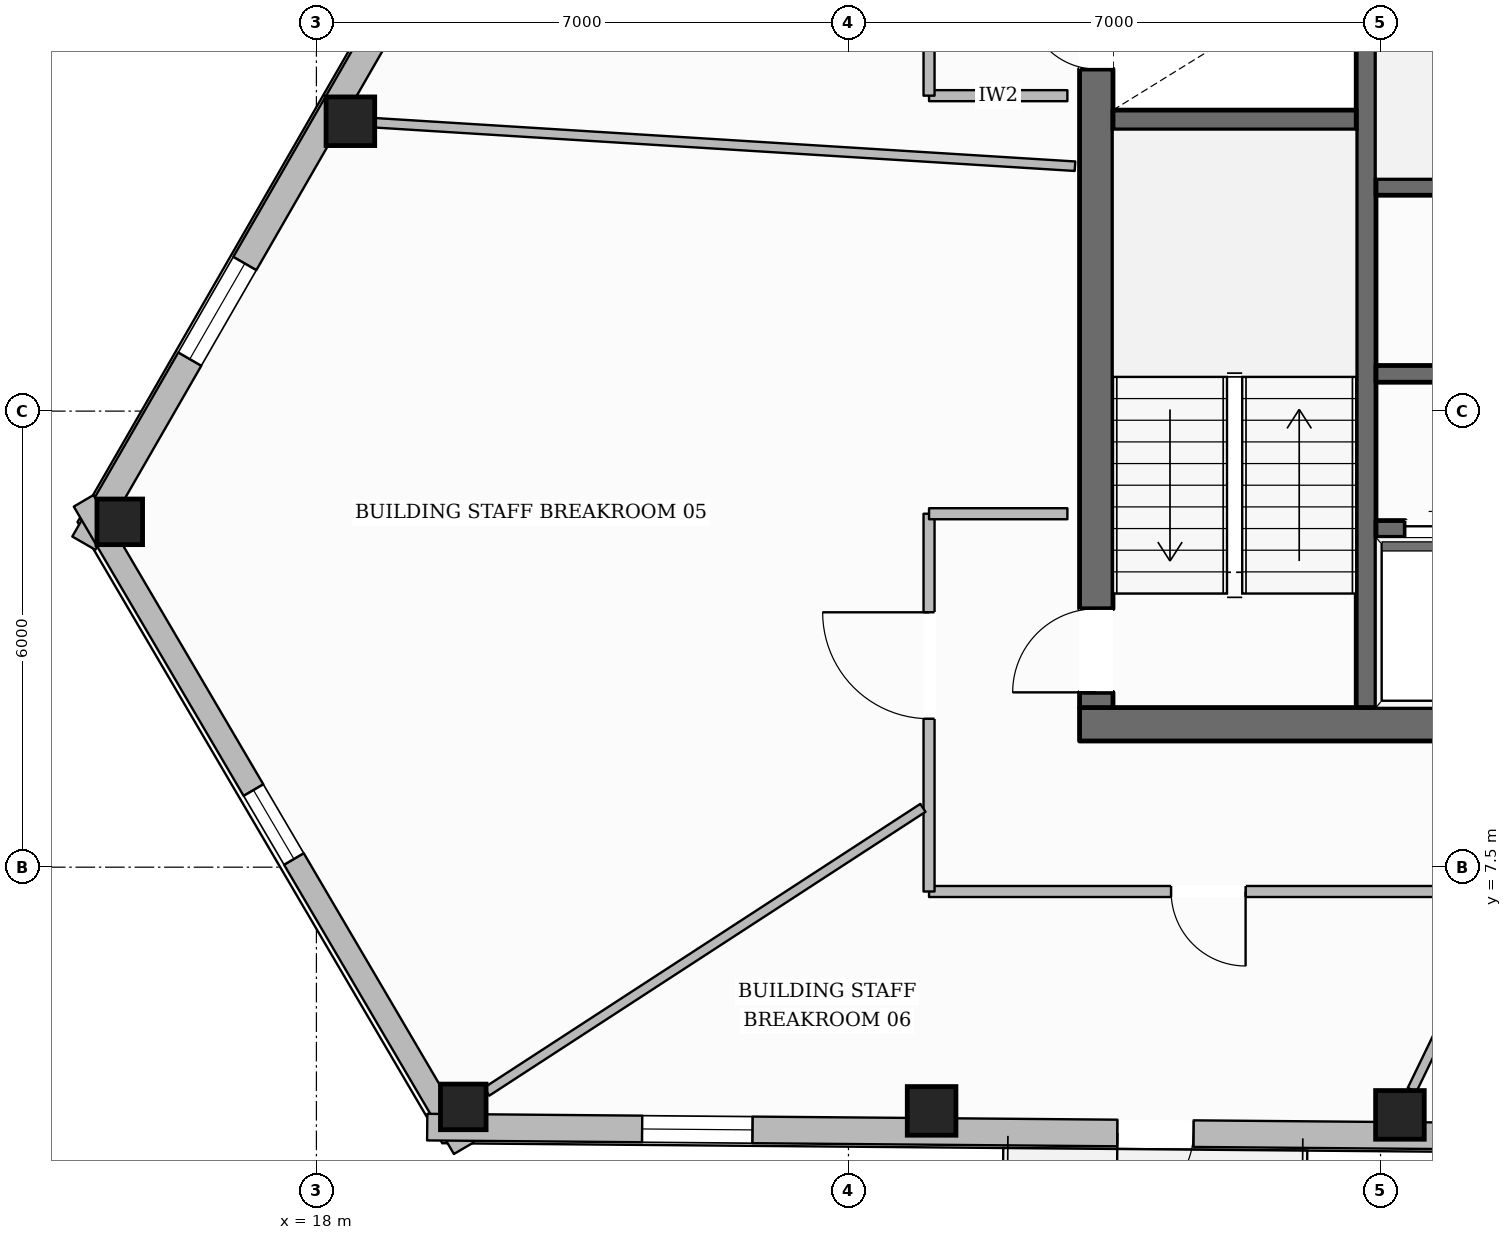
"""IFC4 building model, lengths in metres.
Left out: names, types, materials, properties, quantities, classifications, styles, units other than length and angle.
Written with IfcOpenShell. Run it as: python <this file> out.ifc"""

import sys

from ifc_helpers import new_model, si_unit, direction, frame, frame_2d, origin, origin_2d, place, context, subcontext, project, spatial, rectangle, hollow_rectangle, extrude, element, fill, save


model = new_model("IFC4")
c1 = context("Model", 3, precision=1e-05, world=origin(), true_north=direction((0.0, 1.0)))
c2 = subcontext(c1, "Body", "Model", "MODEL_VIEW")
j1 = project(units=[si_unit("LENGTHUNIT", "METRE"), si_unit("PLANEANGLEUNIT", "RADIAN")], contexts=[c1])
p1 = place(None, origin())
s1 = spatial("IfcSite", under=j1, at=p1, CompositionType="ELEMENT")
p2 = place(p1, origin())
s2 = spatial("IfcBuilding", under=s1, at=p2, CompositionType="ELEMENT")
p3 = place(p2, frame((0.0, 0.0, 191.95)))
s3 = spatial("IfcBuildingStorey", under=s2, at=p3, CompositionType="ELEMENT", Elevation=191.95)
p4 = place(p3, frame((28.04, 9.38, 0.0), z_axis=(0.0, 0.0, 1.0), x_axis=(1.0, 0.0, 0.0)))
e1 = element("IfcWall", 1, at=p4, inside=s3, PredefinedType="SOLIDWALL", context=c2, shape_type="SweptSolid", body=[
    extrude(rectangle(XDim=19.92, YDim=0.44, at=frame_2d((9.96, 0.0))), origin(), (0.0, 0.0, 1.0), 3.6),
])
p5 = place(p4, frame((10.46, 0.0, 0.0)))
e2 = element("IfcOpeningElement", 2, at=p5, cuts=e1, PredefinedType="OPENING", context=c2, shape_type="SweptSolid", body=[
    extrude(rectangle(XDim=1.4, YDim=2.2, at=frame_2d((0.7, 1.1))), frame((0.0, 0.23, 0.0), z_axis=(0.0, -1.0, 0.0), x_axis=(1.0, 0.0, 0.0)), (0.0, 0.0, 1.0), 0.46),
])
p6 = place(p3, frame((28.26, 9.6, 0.0), z_axis=(0.0, 0.0, 1.0), x_axis=(0.0, 1.0, 0.0)))
e3 = element("IfcWall", 3, at=p6, inside=s3, PredefinedType="SOLIDWALL", context=c2, shape_type="SweptSolid", body=[
    extrude(rectangle(XDim=13.0, YDim=0.44, at=frame_2d((6.5, 0.0))), origin(), (0.0, 0.0, 1.0), 3.6),
])
p7 = place(p6, frame((0.2, 0.0, 0.0)))
e4 = element("IfcOpeningElement", 4, at=p7, cuts=e3, PredefinedType="OPENING", context=c2, shape_type="SweptSolid", body=[
    extrude(rectangle(XDim=1.1, YDim=2.15, at=frame_2d((0.55, 1.075))), frame((0.0, 0.23, 0.0), z_axis=(0.0, -1.0, 0.0), x_axis=(1.0, 0.0, 0.0)), (0.0, 0.0, 1.0), 0.46),
])
p8 = place(p6, frame((8.4, 0.0, 0.0)))
e5 = element("IfcOpeningElement", 5, at=p8, cuts=e3, PredefinedType="OPENING", context=c2, shape_type="SweptSolid", body=[
    extrude(rectangle(XDim=0.9, YDim=2.1, at=frame_2d((0.45, 1.05))), frame((0.0, 0.23, 0.0), z_axis=(0.0, -1.0, 0.0), x_axis=(1.0, 0.0, 0.0)), (0.0, 0.0, 1.0), 0.46),
])
p9 = place(p3, frame((31.81, 9.6, 0.0), z_axis=(0.0, 0.0, 1.0), x_axis=(0.0, 1.0, 0.0)))
e6 = element("IfcWall", 6, at=p9, inside=s3, PredefinedType="SHEAR", context=c2, shape_type="SweptSolid", body=[
    extrude(rectangle(XDim=13.0, YDim=0.26, at=frame_2d((6.5, 0.0))), origin(), (0.0, 0.0, 1.0), 3.6),
])
p10 = place(p9, frame((10.925, 0.0, 0.0)))
e7 = element("IfcOpeningElement", 7, at=p10, cuts=e6, PredefinedType="OPENING", context=c2, shape_type="SweptSolid", body=[
    extrude(rectangle(XDim=1.25, YDim=2.25, at=frame_2d((0.625, 1.125))), frame((0.0, 0.14, 0.0), z_axis=(0.0, -1.0, 0.0), x_axis=(1.0, 0.0, 0.0)), (0.0, 0.0, 1.0), 0.28),
])
p11 = place(p3, frame((28.48, 17.33, 0.0), z_axis=(0.0, 0.0, 1.0), x_axis=(1.0, 0.0, 0.0)))
e8 = element("IfcWall", 8, at=p11, inside=s3, PredefinedType="SHEAR", context=c2, shape_type="SweptSolid", body=[
    extrude(rectangle(XDim=3.2, YDim=0.26, at=frame_2d((1.6, 0.0))), origin(), (0.0, 0.0, 1.0), 3.6),
])
p12 = place(p3, frame((31.94, 16.45, 0.0), z_axis=(0.0, 0.0, 1.0), x_axis=(1.0, 0.0, 0.0)))
e9 = element("IfcWall", 9, at=p12, inside=s3, PredefinedType="SOLIDWALL", context=c2, shape_type="SweptSolid", body=[
    extrude(rectangle(XDim=12.12, YDim=0.22, at=frame_2d((6.06, 0.0))), origin(), (0.0, 0.0, 1.0), 3.6),
])
p13 = place(p3, frame((31.94, 13.99, 0.0), z_axis=(0.0, 0.0, 1.0), x_axis=(1.0, 0.0, 0.0)))
e10 = element("IfcWall", 10, at=p13, inside=s3, PredefinedType="SOLIDWALL", context=c2, shape_type="SweptSolid", body=[
    extrude(rectangle(XDim=12.12, YDim=0.22, at=frame_2d((6.06, 0.0))), origin(), (0.0, 0.0, 1.0), 3.6),
])
p14 = place(p13, frame((1.91, 0.0, 0.0)))
e11 = element("IfcOpeningElement", 11, at=p14, cuts=e10, PredefinedType="OPENING", context=c2, shape_type="SweptSolid", body=[
    extrude(rectangle(XDim=0.9, YDim=2.1, at=frame_2d((0.45, 1.05))), frame((0.0, 0.12, 0.0), z_axis=(0.0, -1.0, 0.0), x_axis=(1.0, 0.0, 0.0)), (0.0, 0.0, 1.0), 0.24),
])
p15 = place(p13, frame((7.95, 0.0, 0.0)))
e12 = element("IfcOpeningElement", 12, at=p15, cuts=e10, PredefinedType="OPENING", context=c2, shape_type="SweptSolid", body=[
    extrude(rectangle(XDim=1.02, YDim=2.15, at=frame_2d((0.51, 1.075))), frame((0.0, 0.12, 0.0), z_axis=(0.0, -1.0, 0.0), x_axis=(1.0, 0.0, 0.0)), (0.0, 0.0, 1.0), 0.24),
])
p16 = place(p3, frame((31.94, 11.95, 0.0), z_axis=(0.0, 0.0, 1.0), x_axis=(1.0, 0.0, 0.0)))
e13 = element("IfcWall", 13, at=p16, inside=s3, PredefinedType="SOLIDWALL", context=c2, shape_type="SweptSolid", body=[
    extrude(rectangle(XDim=6.19, YDim=0.22, at=frame_2d((3.095, 0.0))), origin(), (0.0, 0.0, 1.0), 3.6),
])
p17 = place(p16, frame((0.385, 0.0, 0.0)))
e14 = element("IfcOpeningElement", 14, at=p17, cuts=e13, PredefinedType="OPENING", context=c2, shape_type="SweptSolid", body=[
    extrude(rectangle(XDim=1.1, YDim=2.2, at=frame_2d((0.55, 1.1))), frame((0.0, 0.12, 0.0), z_axis=(0.0, -1.0, 0.0), x_axis=(1.0, 0.0, 0.0)), (0.0, 0.0, 1.0), 0.24),
])
p18 = place(p16, frame((2.435, 0.0, 0.0)))
e15 = element("IfcOpeningElement", 15, at=p18, cuts=e13, PredefinedType="OPENING", context=c2, shape_type="SweptSolid", body=[
    extrude(rectangle(XDim=1.1, YDim=2.2, at=frame_2d((0.55, 1.1))), frame((0.0, 0.12, 0.0), z_axis=(0.0, -1.0, 0.0), x_axis=(1.0, 0.0, 0.0)), (0.0, 0.0, 1.0), 0.24),
])
p19 = place(p16, frame((4.485, 0.0, 0.0)))
e16 = element("IfcOpeningElement", 16, at=p19, cuts=e13, PredefinedType="OPENING", context=c2, shape_type="SweptSolid", body=[
    extrude(rectangle(XDim=1.1, YDim=2.2, at=frame_2d((0.55, 1.1))), frame((0.0, 0.12, 0.0), z_axis=(0.0, -1.0, 0.0), x_axis=(1.0, 0.0, 0.0)), (0.0, 0.0, 1.0), 0.24),
])
p20 = place(p3, frame((18.447, 17.313, 0.0), z_axis=(0.0, 0.0, 1.0), x_axis=(1.0, 0.0, 0.0)))
e17 = element("IfcColumn", 17, at=p20, inside=s3, PredefinedType="COLUMN", context=c2, shape_type="SweptSolid", body=[
    extrude(hollow_rectangle(XDim=0.64, YDim=0.64, WallThickness=0.028, at=origin_2d()), origin(), (0.0, 0.0, 1.0), 3.6),
])
for number, where, z_axis, x_axis in (
    (18, (15.413, 12.043, 0.0), (0.0, 0.0, 1.0), (1.0, 0.0, 0.0)),
    (19, (19.932, 4.346, 0.0), (0.0, 0.0, 1.0), (1.0, 0.0, 0.0)),
):
    element("IfcColumn", number, at=place(p3, frame(where, z_axis=z_axis, x_axis=x_axis)), inside=s3, PredefinedType="COLUMN", context=c2, shape_type="SweptSolid", body=[
        extrude(hollow_rectangle(XDim=0.6, YDim=0.6, WallThickness=0.028, at=origin_2d()), origin(), (0.0, 0.0, 1.0), 3.6),
    ])
for number, where, z_axis, x_axis in (
    (20, (26.094, 4.294, 0.0), (0.0, 0.0, 1.0), (1.0, 0.0, 0.0)),
    (21, (32.255, 4.241, 0.0), (0.0, 0.0, 1.0), (1.0, 0.0, 0.0)),
):
    element("IfcColumn", number, at=place(p3, frame(where, z_axis=z_axis, x_axis=x_axis)), inside=s3, PredefinedType="COLUMN", context=c2, shape_type="SweptSolid", body=[
        extrude(hollow_rectangle(XDim=0.64, YDim=0.64, WallThickness=0.028, at=origin_2d()), origin(), (0.0, 0.0, 1.0), 3.6),
    ])
p21 = place(p3, frame((14.94, 11.763, 0.0), z_axis=(0.0, 0.0, 1.0), x_axis=(0.498943522518, 0.866634502739, 0.0)))
e22 = element("IfcWall", 22, at=p21, inside=s3, PredefinedType="STANDARD", context=c2, shape_type="SweptSolid", body=[
    extrude(rectangle(XDim=37.445, YDim=0.35, at=frame_2d((18.723, 0.0))), origin(), (0.0, 0.0, 1.0), 3.132),
])
p22 = place(p21, frame((27.484, 0.0, 0.0)))
e23 = element("IfcOpeningElement", 23, at=p22, cuts=e22, PredefinedType="OPENING", context=c2, shape_type="SweptSolid", body=[
    extrude(rectangle(XDim=1.0, YDim=2.2, at=frame_2d((0.5, 1.1))), frame((0.0, 0.185, 0.0), z_axis=(0.0, -1.0, 0.0), x_axis=(1.0, 0.0, 0.0)), (0.0, 0.0, 1.0), 0.37),
])
p23 = place(p21, frame((33.2, 0.0, 0.65)))
e24 = element("IfcOpeningElement", 24, at=p23, cuts=e22, PredefinedType="OPENING", context=c2, shape_type="SweptSolid", body=[
    extrude(rectangle(XDim=1.45, YDim=1.75, at=frame_2d((0.725, 0.875))), frame((0.0, 0.185, 0.0), z_axis=(0.0, -1.0, 0.0), x_axis=(1.0, 0.0, 0.0)), (0.0, 0.0, 1.0), 0.37),
])
p24 = place(p21, frame((21.038, 0.0, 0.65)))
e25 = element("IfcOpeningElement", 25, at=p24, cuts=e22, PredefinedType="OPENING", context=c2, shape_type="SweptSolid", body=[
    extrude(rectangle(XDim=1.45, YDim=1.75, at=frame_2d((0.725, 0.875))), frame((0.0, 0.185, 0.0), z_axis=(0.0, -1.0, 0.0), x_axis=(1.0, 0.0, 0.0)), (0.0, 0.0, 1.0), 0.37),
])
p25 = place(p21, frame((8.875, 0.0, 0.65)))
e26 = element("IfcOpeningElement", 26, at=p25, cuts=e22, PredefinedType="OPENING", context=c2, shape_type="SweptSolid", body=[
    extrude(rectangle(XDim=1.45, YDim=1.75, at=frame_2d((0.725, 0.875))), frame((0.0, 0.185, 0.0), z_axis=(0.0, -1.0, 0.0), x_axis=(1.0, 0.0, 0.0)), (0.0, 0.0, 1.0), 0.37),
])
p26 = place(p21, frame((2.795, 0.0, 0.65)))
e27 = element("IfcOpeningElement", 27, at=p26, cuts=e22, PredefinedType="OPENING", context=c2, shape_type="SweptSolid", body=[
    extrude(rectangle(XDim=1.45, YDim=1.75, at=frame_2d((0.725, 0.875))), frame((0.0, 0.185, 0.0), z_axis=(0.0, -1.0, 0.0), x_axis=(1.0, 0.0, 0.0)), (0.0, 0.0, 1.0), 0.37),
])
p27 = place(p3, frame((19.938, 3.802, 0.0), z_axis=(0.0, 0.0, 1.0), x_axis=(-0.506326456483, 0.862341880849, 0.0)))
e28 = element("IfcWall", 28, at=p27, inside=s3, PredefinedType="STANDARD", context=c2, shape_type="SweptSolid", body=[
    extrude(rectangle(XDim=9.877, YDim=0.3, at=frame_2d((4.938, 0.0))), origin(), (0.0, 0.0, 1.0), 3.132),
])
p28 = place(p27, frame((4.414, 0.0, 0.65)))
e29 = element("IfcOpeningElement", 29, at=p28, cuts=e28, PredefinedType="OPENING", context=c2, shape_type="SweptSolid", body=[
    extrude(rectangle(XDim=1.05, YDim=1.7, at=frame_2d((0.525, 0.85))), frame((0.0, 0.16, 0.0), z_axis=(0.0, -1.0, 0.0), x_axis=(1.0, 0.0, 0.0)), (0.0, 0.0, 1.0), 0.32),
])
p29 = place(p3, frame((57.379, 3.757, 0.0), z_axis=(0.0, 0.0, 1.0), x_axis=(-0.999963726544, 0.008517370208, 0.0)))
e30 = element("IfcWall", 30, at=p29, inside=s3, PredefinedType="STANDARD", context=c2, shape_type="SweptSolid", body=[
    extrude(rectangle(XDim=37.922, YDim=0.35, at=frame_2d((18.961, 0.0))), origin(), (0.0, 0.0, 1.0), 3.132),
])
p30 = place(p29, frame((27.842, 0.0, 0.0)))
e31 = element("IfcOpeningElement", 31, at=p30, cuts=e30, PredefinedType="OPENING", context=c2, shape_type="SweptSolid", body=[
    extrude(rectangle(XDim=1.0, YDim=2.2, at=frame_2d((0.5, 1.1))), frame((0.0, 0.185, 0.0), z_axis=(0.0, -1.0, 0.0), x_axis=(1.0, 0.0, 0.0)), (0.0, 0.0, 1.0), 0.37),
])
p31 = place(p29, frame((33.644, 0.0, 0.65)))
e32 = element("IfcOpeningElement", 32, at=p31, cuts=e30, PredefinedType="OPENING", context=c2, shape_type="SweptSolid", body=[
    extrude(rectangle(XDim=1.45, YDim=1.75, at=frame_2d((0.725, 0.875))), frame((0.0, 0.185, 0.0), z_axis=(0.0, -1.0, 0.0), x_axis=(1.0, 0.0, 0.0)), (0.0, 0.0, 1.0), 0.37),
])
p32 = place(p29, frame((21.321, 0.0, 0.65)))
e33 = element("IfcOpeningElement", 33, at=p32, cuts=e30, PredefinedType="OPENING", context=c2, shape_type="SweptSolid", body=[
    extrude(rectangle(XDim=1.45, YDim=1.75, at=frame_2d((0.725, 0.875))), frame((0.0, 0.185, 0.0), z_axis=(0.0, -1.0, 0.0), x_axis=(1.0, 0.0, 0.0)), (0.0, 0.0, 1.0), 0.37),
])
p33 = place(p29, frame((8.998, 0.0, 0.65)))
e34 = element("IfcOpeningElement", 34, at=p33, cuts=e30, PredefinedType="OPENING", context=c2, shape_type="SweptSolid", body=[
    extrude(rectangle(XDim=1.45, YDim=1.75, at=frame_2d((0.725, 0.875))), frame((0.0, 0.185, 0.0), z_axis=(0.0, -1.0, 0.0), x_axis=(1.0, 0.0, 0.0)), (0.0, 0.0, 1.0), 0.37),
])
p34 = place(p29, frame((2.836, 0.0, 0.65)))
e35 = element("IfcOpeningElement", 35, at=p34, cuts=e30, PredefinedType="OPENING", context=c2, shape_type="SweptSolid", body=[
    extrude(rectangle(XDim=1.45, YDim=1.75, at=frame_2d((0.725, 0.875))), frame((0.0, 0.185, 0.0), z_axis=(0.0, -1.0, 0.0), x_axis=(1.0, 0.0, 0.0)), (0.0, 0.0, 1.0), 0.37),
])
p35 = place(p3, frame((27.88, 17.65, 0.0), z_axis=(0.0, 0.0, 1.0), x_axis=(-1.0, 0.0, 0.0)))
e36 = element("IfcWall", 36, at=p35, inside=s3, PredefinedType="PARTITIONING", context=c2, shape_type="SweptSolid", body=[
    extrude(rectangle(XDim=1.82, YDim=0.145, at=frame_2d((0.91, 0.0))), origin(), (0.0, 0.0, 1.0), 3.6),
])
p36 = place(p3, frame((26.06, 17.65, 0.0), z_axis=(0.0, 0.0, 1.0), x_axis=(0.0, 1.0, 0.0)))
e37 = element("IfcWall", 37, at=p36, inside=s3, PredefinedType="PARTITIONING", context=c2, shape_type="SweptSolid", body=[
    extrude(rectangle(XDim=7.37, YDim=0.145, at=frame_2d((3.685, 0.0))), origin(), (0.0, 0.0, 1.0), 3.339),
])
p37 = place(p36, frame((2.985, 0.0, 0.0)))
e38 = element("IfcOpeningElement", 38, at=p37, cuts=e37, PredefinedType="OPENING", context=c2, shape_type="SweptSolid", body=[
    extrude(rectangle(XDim=1.4, YDim=2.2, at=frame_2d((0.7, 1.1))), frame((0.0, 0.083, 0.0), z_axis=(0.0, -1.0, 0.0), x_axis=(1.0, 0.0, 0.0)), (0.0, 0.0, 1.0), 0.165),
])
p38 = place(p3, frame((49.94, 7.18, 0.0), z_axis=(0.0, 0.0, 1.0), x_axis=(-1.0, 0.0, 0.0)))
e39 = element("IfcWall", 39, at=p38, inside=s3, PredefinedType="PARTITIONING", context=c2, shape_type="SweptSolid", body=[
    extrude(rectangle(XDim=23.88, YDim=0.145, at=frame_2d((11.94, 0.0))), origin(), (0.0, 0.0, 1.0), 3.6),
])
p39 = place(p38, frame((19.715, 0.0, 0.0)))
e40 = element("IfcOpeningElement", 40, at=p39, cuts=e39, PredefinedType="OPENING", context=c2, shape_type="SweptSolid", body=[
    extrude(rectangle(XDim=0.98, YDim=2.15, at=frame_2d((0.49, 1.075))), frame((0.0, 0.083, 0.0), z_axis=(0.0, -1.0, 0.0), x_axis=(1.0, 0.0, 0.0)), (0.0, 0.0, 1.0), 0.165),
])
p40 = place(p38, frame((9.816, 0.0, 0.0)))
e41 = element("IfcOpeningElement", 41, at=p40, cuts=e39, PredefinedType="OPENING", context=c2, shape_type="SweptSolid", body=[
    extrude(rectangle(XDim=0.98, YDim=2.15, at=frame_2d((0.49, 1.075))), frame((0.0, 0.083, 0.0), z_axis=(0.0, -1.0, 0.0), x_axis=(1.0, 0.0, 0.0)), (0.0, 0.0, 1.0), 0.165),
])
p41 = place(p38, frame((2.444, 0.0, 0.0)))
e42 = element("IfcOpeningElement", 42, at=p41, cuts=e39, PredefinedType="OPENING", context=c2, shape_type="SweptSolid", body=[
    extrude(rectangle(XDim=1.02, YDim=2.15, at=frame_2d((0.51, 1.075))), frame((0.0, 0.083, 0.0), z_axis=(0.0, -1.0, 0.0), x_axis=(1.0, 0.0, 0.0)), (0.0, 0.0, 1.0), 0.165),
])
p42 = place(p3, frame((26.06, 7.18, 0.0), z_axis=(0.0, 0.0, 1.0), x_axis=(0.0, 1.0, 0.0)))
e43 = element("IfcWall", 43, at=p42, inside=s3, PredefinedType="PARTITIONING", context=c2, shape_type="SweptSolid", body=[
    extrude(rectangle(XDim=4.97, YDim=0.145, at=frame_2d((2.485, 0.0))), origin(), (0.0, 0.0, 1.0), 3.6),
])
p43 = place(p42, frame((2.273, 0.0, 0.0)))
e44 = element("IfcOpeningElement", 44, at=p43, cuts=e43, PredefinedType="OPENING", context=c2, shape_type="SweptSolid", body=[
    extrude(rectangle(XDim=1.4, YDim=2.2, at=frame_2d((0.7, 1.1))), frame((0.0, 0.083, 0.0), z_axis=(0.0, -1.0, 0.0), x_axis=(1.0, 0.0, 0.0)), (0.0, 0.0, 1.0), 0.165),
])
p44 = place(p3, frame((26.06, 12.15, 0.0), z_axis=(0.0, 0.0, 1.0), x_axis=(1.0, 0.0, 0.0)))
e45 = element("IfcWall", 45, at=p44, inside=s3, PredefinedType="PARTITIONING", context=c2, shape_type="SweptSolid", body=[
    extrude(rectangle(XDim=1.82, YDim=0.145, at=frame_2d((0.91, 0.0))), origin(), (0.0, 0.0, 1.0), 3.141),
])
p45 = place(p3, frame((27.98, 16.722, 0.0), z_axis=(0.0, 0.0, 1.0), x_axis=(-0.998078039193, 0.061969570596, 0.0)))
e46 = element("IfcWall", 46, at=p45, inside=s3, PredefinedType="PARTITIONING", context=c2, shape_type="SweptSolid", body=[
    extrude(rectangle(XDim=9.223, YDim=0.125, at=frame_2d((4.611, 0.0))), origin(), (0.0, 0.0, 1.0), 3.141),
])
p46 = place(p3, frame((25.979, 8.28, 0.0), z_axis=(0.0, 0.0, 1.0), x_axis=(-0.838234999643, -0.545309164946, 0.0)))
e47 = element("IfcWall", 47, at=p46, inside=s3, PredefinedType="PARTITIONING", context=c2, shape_type="SweptSolid", body=[
    extrude(rectangle(XDim=6.847, YDim=0.125, at=frame_2d((3.423, 0.0))), origin(), (0.0, 0.0, 1.0), 3.141),
])
p47 = place(p3, frame((33.64, 7.1, 0.0), z_axis=(0.0, 0.0, 1.0), x_axis=(-0.435960320496, -0.899965887661, 0.0)))
e48 = element("IfcWall", 48, at=p47, inside=s3, PredefinedType="PARTITIONING", context=c2, shape_type="SweptSolid", body=[
    extrude(rectangle(XDim=2.812, YDim=0.125, at=frame_2d((1.406, 0.0))), origin(), (0.0, 0.0, 1.0), 3.6),
])
p48 = place(p30, origin())
e49 = element("IfcDoor", 49, at=p48, inside=s3, OperationType="SINGLE_SWING_RIGHT", PredefinedType="DOOR", context=c2, shape_type="SweptSolid", body=[
    extrude(rectangle(XDim=1.0, YDim=2.2, at=frame_2d((0.5, 1.1))), frame((0.0, 0.025, 0.0), z_axis=(0.0, -1.0, 0.0), x_axis=(1.0, 0.0, 0.0)), (0.0, 0.0, 1.0), 0.05),
])
fill(e31, e49)
p49 = place(p26, origin())
e50 = element("IfcWindow", 50, at=p49, inside=s3, PartitioningType="SINGLE_PANEL", PredefinedType="WINDOW", context=c2, shape_type="SweptSolid", body=[
    extrude(rectangle(XDim=1.45, YDim=1.75, at=frame_2d((0.725, 0.875))), frame((0.0, 0.03, 0.0), z_axis=(0.0, -1.0, 0.0), x_axis=(1.0, 0.0, 0.0)), (0.0, 0.0, 1.0), 0.06),
])
fill(e27, e50)
p50 = place(p31, origin())
e51 = element("IfcWindow", 51, at=p50, inside=s3, PartitioningType="SINGLE_PANEL", PredefinedType="WINDOW", context=c2, shape_type="SweptSolid", body=[
    extrude(rectangle(XDim=1.45, YDim=1.75, at=frame_2d((0.725, 0.875))), frame((0.0, 0.03, 0.0), z_axis=(0.0, -1.0, 0.0), x_axis=(1.0, 0.0, 0.0)), (0.0, 0.0, 1.0), 0.06),
])
fill(e32, e51)
p51 = place(p28, origin())
e52 = element("IfcWindow", 52, at=p51, inside=s3, PartitioningType="SINGLE_PANEL", PredefinedType="WINDOW", context=c2, shape_type="SweptSolid", body=[
    extrude(rectangle(XDim=1.05, YDim=1.7, at=frame_2d((0.525, 0.85))), frame((0.0, 0.03, 0.0), z_axis=(0.0, -1.0, 0.0), x_axis=(1.0, 0.0, 0.0)), (0.0, 0.0, 1.0), 0.06),
])
fill(e29, e52)
p52 = place(p7, origin())
e53 = element("IfcDoor", 53, at=p52, inside=s3, OperationType="SINGLE_SWING_LEFT", PredefinedType="DOOR", context=c2, shape_type="SweptSolid", body=[
    extrude(rectangle(XDim=1.1, YDim=2.15, at=frame_2d((0.55, 1.075))), frame((0.0, 0.025, 0.0), z_axis=(0.0, -1.0, 0.0), x_axis=(1.0, 0.0, 0.0)), (0.0, 0.0, 1.0), 0.05),
])
fill(e4, e53)
p53 = place(p8, origin())
e54 = element("IfcDoor", 54, at=p53, inside=s3, OperationType="SINGLE_SWING_RIGHT", PredefinedType="DOOR", context=c2, shape_type="SweptSolid", body=[
    extrude(rectangle(XDim=0.9, YDim=2.1, at=frame_2d((0.45, 1.05))), frame((0.0, 0.025, 0.0), z_axis=(0.0, -1.0, 0.0), x_axis=(1.0, 0.0, 0.0)), (0.0, 0.0, 1.0), 0.05),
])
fill(e5, e54)
p54 = place(p17, origin())
e55 = element("IfcDoor", 55, at=p54, inside=s3, OperationType="DOUBLE_DOOR_SLIDING", PredefinedType="DOOR", context=c2, shape_type="SweptSolid", body=[
    extrude(rectangle(XDim=1.1, YDim=2.2, at=frame_2d((0.55, 1.1))), frame((0.0, 0.025, 0.0), z_axis=(0.0, -1.0, 0.0), x_axis=(1.0, 0.0, 0.0)), (0.0, 0.0, 1.0), 0.05),
])
fill(e14, e55)
p55 = place(p43, origin())
e56 = element("IfcDoor", 56, at=p55, inside=s3, OperationType="SINGLE_SWING_RIGHT", PredefinedType="DOOR", context=c2, shape_type="SweptSolid", body=[
    extrude(rectangle(XDim=1.4, YDim=2.2, at=frame_2d((0.7, 1.1))), frame((0.0, 0.025, 0.0), z_axis=(0.0, -1.0, 0.0), x_axis=(1.0, 0.0, 0.0)), (0.0, 0.0, 1.0), 0.05),
])
fill(e44, e56)
p56 = place(p39, origin())
e57 = element("IfcDoor", 57, at=p56, inside=s3, OperationType="SINGLE_SWING_LEFT", PredefinedType="DOOR", context=c2, shape_type="SweptSolid", body=[
    extrude(rectangle(XDim=0.98, YDim=2.15, at=frame_2d((0.49, 1.075))), frame((0.0, 0.025, 0.0), z_axis=(0.0, -1.0, 0.0), x_axis=(1.0, 0.0, 0.0)), (0.0, 0.0, 1.0), 0.05),
])
fill(e40, e57)
save(model, sys.argv[1])
